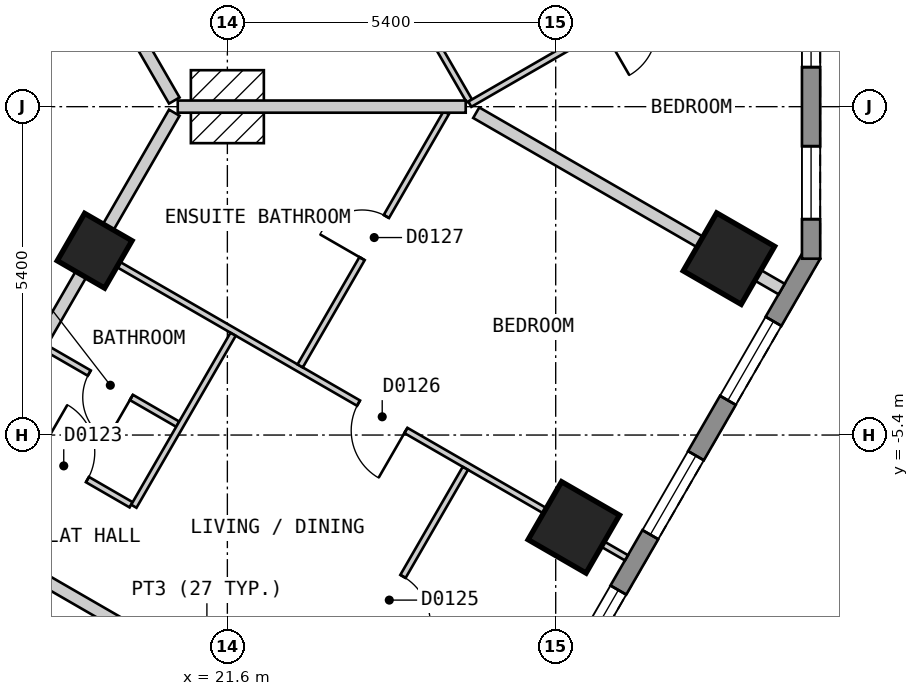
"""IFC4 building model, lengths in metres.
Left out: names, types, materials, properties, quantities, classifications, styles, units other than length and angle.
Written with IfcOpenShell. Run it as: python <this file> out.ifc"""

import sys

from ifc_helpers import new_model, si_unit, direction, frame, frame_2d, origin, origin_2d, place, context, subcontext, project, spatial, polyline, rectangle, outline, extrude, element, fill, save


model = new_model("IFC4")
c1 = context("Model", 3, precision=1e-05, world=origin(), true_north=direction((0.0, 1.0)))
c2 = subcontext(c1, "Body", "Model", "MODEL_VIEW")
j1 = project(units=[si_unit("LENGTHUNIT", "METRE"), si_unit("PLANEANGLEUNIT", "RADIAN")], contexts=[c1])
p1 = place(None, origin())
s1 = spatial("IfcSite", under=j1, at=p1, CompositionType="ELEMENT")
p2 = place(p1, origin())
s2 = spatial("IfcBuilding", under=s1, at=p2, CompositionType="ELEMENT")
p3 = place(p2, frame((0.0, 0.0, 23.4)))
s3 = spatial("IfcBuildingStorey", under=s2, at=p3, CompositionType="ELEMENT", Elevation=23.4)
for number, where, z_axis, x_axis in (
    (1, (27.298, -6.919, 0.0), (0.0, 0.0, 1.0), (0.5, 0.866, 0.0)),
    (2, (29.849, -2.499, 0.0), (0.0, 0.0, 1.0), (0.5, 0.866, 0.0)),
):
    element("IfcColumn", number, at=place(p3, frame(where, z_axis=z_axis, x_axis=x_axis)), inside=s3, PredefinedType="COLUMN", context=c2, shape_type="SweptSolid", body=[
        extrude(rectangle(XDim=1.1, YDim=1.1, at=origin_2d()), origin(), (0.0, 0.0, 1.0), 3.0),
    ])
p4 = place(p3, frame((19.417, -2.369, 0.0), z_axis=(0.0, 0.0, 1.0), x_axis=(0.499984884929, 0.866034130299, 0.0)))
e3 = element("IfcColumn", 3, at=p4, inside=s3, PredefinedType="COLUMN", context=c2, shape_type="SweptSolid", body=[
    extrude(rectangle(XDim=0.9, YDim=0.9, at=origin_2d()), origin(), (0.0, 0.0, 1.0), 3.0),
])
p5 = place(p3, frame((17.71, -25.825, 0.0), z_axis=(0.0, 0.0, 1.0), x_axis=(0.500001938803, 0.866024284413, 0.0)))
e4 = element("IfcWall", 4, at=p5, inside=s3, PredefinedType="SOLIDWALL", context=c2, shape_type="SweptSolid", body=[
    extrude(outline(polyline([(0.0, -0.15), (27.02, -0.15), (26.94, 0.15), (0.08, 0.15), (0.0, -0.15)])), origin(), (0.0, 0.0, 1.0), 2.7),
])
p6 = place(p5, frame((1.277, 0.0, 0.15)))
e5 = element("IfcOpeningElement", 5, at=p6, cuts=e4, PredefinedType="OPENING", context=c2, shape_type="SweptSolid", body=[
    extrude(rectangle(XDim=1.5, YDim=2.1, at=frame_2d((0.75, 1.05))), frame((0.0, 0.16, 0.0), z_axis=(0.0, -1.0, 0.0), x_axis=(1.0, 0.0, 0.0)), (0.0, 0.0, 1.0), 0.32),
])
p7 = place(p5, frame((3.829, 0.0, 0.15)))
e6 = element("IfcOpeningElement", 6, at=p7, cuts=e4, PredefinedType="OPENING", context=c2, shape_type="SweptSolid", body=[
    extrude(rectangle(XDim=1.5, YDim=2.1, at=frame_2d((0.75, 1.05))), frame((0.0, 0.16, 0.0), z_axis=(0.0, -1.0, 0.0), x_axis=(1.0, 0.0, 0.0)), (0.0, 0.0, 1.0), 0.32),
])
p8 = place(p5, frame((6.382, 0.0, 0.15)))
e7 = element("IfcOpeningElement", 7, at=p8, cuts=e4, PredefinedType="OPENING", context=c2, shape_type="SweptSolid", body=[
    extrude(rectangle(XDim=1.5, YDim=2.1, at=frame_2d((0.75, 1.05))), frame((0.0, 0.16, 0.0), z_axis=(0.0, -1.0, 0.0), x_axis=(1.0, 0.0, 0.0)), (0.0, 0.0, 1.0), 0.32),
])
p9 = place(p5, frame((8.933, 0.0, 0.15)))
e8 = element("IfcOpeningElement", 8, at=p9, cuts=e4, PredefinedType="OPENING", context=c2, shape_type="SweptSolid", body=[
    extrude(rectangle(XDim=1.5, YDim=2.1, at=frame_2d((0.75, 1.05))), frame((0.0, 0.16, 0.0), z_axis=(0.0, -1.0, 0.0), x_axis=(1.0, 0.0, 0.0)), (0.0, 0.0, 1.0), 0.32),
])
p10 = place(p5, frame((11.485, 0.0, 0.15)))
e9 = element("IfcOpeningElement", 9, at=p10, cuts=e4, PredefinedType="OPENING", context=c2, shape_type="SweptSolid", body=[
    extrude(rectangle(XDim=1.5, YDim=2.1, at=frame_2d((0.75, 1.05))), frame((0.0, 0.16, 0.0), z_axis=(0.0, -1.0, 0.0), x_axis=(1.0, 0.0, 0.0)), (0.0, 0.0, 1.0), 0.32),
])
p11 = place(p5, frame((14.037, 0.0, 0.15)))
e10 = element("IfcOpeningElement", 10, at=p11, cuts=e4, PredefinedType="OPENING", context=c2, shape_type="SweptSolid", body=[
    extrude(rectangle(XDim=1.5, YDim=2.1, at=frame_2d((0.75, 1.05))), frame((0.0, 0.16, 0.0), z_axis=(0.0, -1.0, 0.0), x_axis=(1.0, 0.0, 0.0)), (0.0, 0.0, 1.0), 0.32),
])
p12 = place(p5, frame((16.589, 0.0, 0.15)))
e11 = element("IfcOpeningElement", 11, at=p12, cuts=e4, PredefinedType="OPENING", context=c2, shape_type="SweptSolid", body=[
    extrude(rectangle(XDim=1.5, YDim=2.1, at=frame_2d((0.75, 1.05))), frame((0.0, 0.16, 0.0), z_axis=(0.0, -1.0, 0.0), x_axis=(1.0, 0.0, 0.0)), (0.0, 0.0, 1.0), 0.32),
])
p13 = place(p5, frame((19.141, 0.0, 0.15)))
e12 = element("IfcOpeningElement", 12, at=p13, cuts=e4, PredefinedType="OPENING", context=c2, shape_type="SweptSolid", body=[
    extrude(rectangle(XDim=1.5, YDim=2.1, at=frame_2d((0.75, 1.05))), frame((0.0, 0.16, 0.0), z_axis=(0.0, -1.0, 0.0), x_axis=(1.0, 0.0, 0.0)), (0.0, 0.0, 1.0), 0.32),
])
p14 = place(p5, frame((21.693, 0.0, 0.15)))
e13 = element("IfcOpeningElement", 13, at=p14, cuts=e4, PredefinedType="OPENING", context=c2, shape_type="SweptSolid", body=[
    extrude(rectangle(XDim=1.5, YDim=2.1, at=frame_2d((0.75, 1.05))), frame((0.0, 0.16, 0.0), z_axis=(0.0, -1.0, 0.0), x_axis=(1.0, 0.0, 0.0)), (0.0, 0.0, 1.0), 0.32),
])
p15 = place(p5, frame((24.244, 0.0, 0.15)))
e14 = element("IfcOpeningElement", 14, at=p15, cuts=e4, PredefinedType="OPENING", context=c2, shape_type="SweptSolid", body=[
    extrude(rectangle(XDim=1.5, YDim=2.1, at=frame_2d((0.75, 1.05))), frame((0.0, 0.16, 0.0), z_axis=(0.0, -1.0, 0.0), x_axis=(1.0, 0.0, 0.0)), (0.0, 0.0, 1.0), 0.32),
])
p16 = place(p3, frame((31.2, -2.5, 0.0), z_axis=(0.0, 0.0, 1.0), x_axis=(0.0, 1.0, 0.0)))
e15 = element("IfcWall", 15, at=p16, inside=s3, PredefinedType="SOLIDWALL", context=c2, shape_type="SweptSolid", body=[
    extrude(outline(polyline([(0.0, -0.15), (5.0, -0.15), (4.92, 0.15), (0.08, 0.15), (0.0, -0.15)])), origin(), (0.0, 0.0, 1.0), 2.7),
])
p17 = place(p16, frame((0.65, 0.0, 0.15)))
e16 = element("IfcOpeningElement", 16, at=p17, cuts=e15, PredefinedType="OPENING", context=c2, shape_type="SweptSolid", body=[
    extrude(rectangle(XDim=1.2, YDim=2.1, at=frame_2d((0.6, 1.05))), frame((0.0, 0.16, 0.0), z_axis=(0.0, -1.0, 0.0), x_axis=(1.0, 0.0, 0.0)), (0.0, 0.0, 1.0), 0.32),
])
p18 = place(p16, frame((3.15, 0.0, 0.15)))
e17 = element("IfcOpeningElement", 17, at=p18, cuts=e15, PredefinedType="OPENING", context=c2, shape_type="SweptSolid", body=[
    extrude(rectangle(XDim=1.2, YDim=2.1, at=frame_2d((0.6, 1.05))), frame((0.0, 0.16, 0.0), z_axis=(0.0, -1.0, 0.0), x_axis=(1.0, 0.0, 0.0)), (0.0, 0.0, 1.0), 0.32),
])
p19 = place(p3, frame((10.45, 17.9, 0.0), z_axis=(0.0, 0.0, 1.0), x_axis=(0.500034352617, -0.866005569383, 0.0)))
e18 = element("IfcWall", 18, at=p19, inside=s3, PredefinedType="PARTITIONING", context=c2, shape_type="SweptSolid", body=[
    extrude(rectangle(XDim=20.553, YDim=0.2, at=frame_2d((10.276, 0.0))), origin(), (0.0, 0.0, 1.0), 2.7),
])
p20 = place(p19, frame((14.903, 0.0, 0.0)))
e19 = element("IfcOpeningElement", 19, at=p20, cuts=e18, PredefinedType="OPENING", context=c2, shape_type="SweptSolid", body=[
    extrude(rectangle(XDim=1.0, YDim=2.1, at=frame_2d((0.5, 1.05))), frame((0.0, 0.11, 0.0), z_axis=(0.0, -1.0, 0.0), x_axis=(1.0, 0.0, 0.0)), (0.0, 0.0, 1.0), 0.22),
])
p21 = place(p19, frame((9.775, 0.0, 0.0)))
e20 = element("IfcOpeningElement", 20, at=p21, cuts=e18, PredefinedType="OPENING", context=c2, shape_type="SweptSolid", body=[
    extrude(rectangle(XDim=1.0, YDim=2.1, at=frame_2d((0.5, 1.05))), frame((0.0, 0.11, 0.0), z_axis=(0.0, -1.0, 0.0), x_axis=(1.0, 0.0, 0.0)), (0.0, 0.0, 1.0), 0.22),
])
p22 = place(p3, frame((16.914, -6.703, 0.0), z_axis=(0.0, 0.0, 1.0), x_axis=(0.50003007663, 0.866008038338, 0.0)))
e21 = element("IfcWall", 21, at=p22, inside=s3, PredefinedType="PARTITIONING", context=c2, shape_type="SweptSolid", body=[
    extrude(rectangle(XDim=7.625, YDim=0.2, at=frame_2d((3.813, 0.0))), origin(), (0.0, 0.0, 1.0), 2.7),
])
p23 = place(p22, frame((1.952, 0.0, 0.0)))
e22 = element("IfcOpeningElement", 22, at=p23, cuts=e21, PredefinedType="OPENING", context=c2, shape_type="SweptSolid", body=[
    extrude(rectangle(XDim=1.0, YDim=2.1, at=frame_2d((0.5, 1.05))), frame((0.0, 0.11, 0.0), z_axis=(0.0, -1.0, 0.0), x_axis=(1.0, 0.0, 0.0)), (0.0, 0.0, 1.0), 0.22),
])
p24 = place(p3, frame((20.551, 8.805, 0.0), z_axis=(0.0, 0.0, 1.0), x_axis=(0.499984387913, -0.86603441724, 0.0)))
e23 = element("IfcWall", 23, at=p24, inside=s3, PredefinedType="PARTITIONING", context=c2, shape_type="SweptSolid", body=[
    extrude(rectangle(XDim=10.058, YDim=0.1, at=frame_2d((5.029, 0.0))), origin(), (0.0, 0.0, 1.0), 2.7),
])
p25 = place(p24, frame((1.978, 0.0, 0.0)))
e24 = element("IfcOpeningElement", 24, at=p25, cuts=e23, PredefinedType="OPENING", context=c2, shape_type="SweptSolid", body=[
    extrude(rectangle(XDim=0.9, YDim=2.1, at=frame_2d((0.45, 1.05))), frame((0.0, 0.06, 0.0), z_axis=(0.0, -1.0, 0.0), x_axis=(1.0, 0.0, 0.0)), (0.0, 0.0, 1.0), 0.12),
])
p26 = place(p24, frame((7.157, 0.0, 0.0)))
e25 = element("IfcOpeningElement", 25, at=p26, cuts=e23, PredefinedType="OPENING", context=c2, shape_type="SweptSolid", body=[
    extrude(rectangle(XDim=0.8, YDim=2.1, at=frame_2d((0.4, 1.05))), frame((0.0, 0.06, 0.0), z_axis=(0.0, -1.0, 0.0), x_axis=(1.0, 0.0, 0.0)), (0.0, 0.0, 1.0), 0.12),
])
p27 = place(p3, frame((17.844, -5.292, 0.0), z_axis=(0.0, 0.0, 1.0), x_axis=(0.865940918122, -0.500146304917, 0.0)))
e26 = element("IfcWall", 26, at=p27, inside=s3, PredefinedType="PARTITIONING", context=c2, shape_type="SweptSolid", body=[
    extrude(rectangle(XDim=2.51, YDim=0.1, at=frame_2d((1.255, 0.0))), origin(), (0.0, 0.0, 1.0), 2.7),
])
p28 = place(p27, frame((0.78, 0.0, 0.0)))
e27 = element("IfcOpeningElement", 27, at=p28, cuts=e26, PredefinedType="OPENING", context=c2, shape_type="SweptSolid", body=[
    extrude(rectangle(XDim=0.9, YDim=2.1, at=frame_2d((0.45, 1.05))), frame((0.0, 0.06, 0.0), z_axis=(0.0, -1.0, 0.0), x_axis=(1.0, 0.0, 0.0)), (0.0, 0.0, 1.0), 0.12),
])
p29 = place(p3, frame((18.61, -3.966, 0.0), z_axis=(0.0, 0.0, 1.0), x_axis=(0.865958718457, -0.500115484592, 0.0)))
e28 = element("IfcWall", 28, at=p29, inside=s3, PredefinedType="PARTITIONING", context=c2, shape_type="SweptSolid", body=[
    extrude(rectangle(XDim=2.509, YDim=0.1, at=frame_2d((1.255, 0.0))), origin(), (0.0, 0.0, 1.0), 2.7),
])
p30 = place(p29, frame((0.83, 0.0, 0.0)))
e29 = element("IfcOpeningElement", 29, at=p30, cuts=e28, PredefinedType="OPENING", context=c2, shape_type="SweptSolid", body=[
    extrude(rectangle(XDim=0.8, YDim=2.1, at=frame_2d((0.4, 1.05))), frame((0.0, 0.06, 0.0), z_axis=(0.0, -1.0, 0.0), x_axis=(1.0, 0.0, 0.0)), (0.0, 0.0, 1.0), 0.12),
])
p31 = place(p3, frame((19.503, -2.419, 0.0), z_axis=(0.0, 0.0, 1.0), x_axis=(0.866047370643, -0.499961950354, 0.0)))
e30 = element("IfcWall", 30, at=p31, inside=s3, PredefinedType="PARTITIONING", context=c2, shape_type="SweptSolid", body=[
    extrude(rectangle(XDim=10.001, YDim=0.1, at=frame_2d((5.0, 0.0))), origin(), (0.0, 0.0, 1.0), 2.7),
])
p32 = place(p31, frame((4.912, 0.0, 0.0)))
e31 = element("IfcOpeningElement", 31, at=p32, cuts=e30, PredefinedType="OPENING", context=c2, shape_type="SweptSolid", body=[
    extrude(rectangle(XDim=0.9, YDim=2.1, at=frame_2d((0.45, 1.05))), frame((0.0, 0.06, 0.0), z_axis=(0.0, -1.0, 0.0), x_axis=(1.0, 0.0, 0.0)), (0.0, 0.0, 1.0), 0.12),
])
p33 = place(p3, frame((20.062, -6.571, 0.0), z_axis=(0.0, 0.0, 1.0), x_axis=(0.49983032932, 0.866123341039, 0.0)))
e32 = element("IfcWall", 32, at=p33, inside=s3, PredefinedType="PARTITIONING", context=c2, shape_type="SweptSolid", body=[
    extrude(rectangle(XDim=3.265, YDim=0.1, at=frame_2d((1.633, 0.0))), origin(), (0.0, 0.0, 1.0), 2.7),
])
p34 = place(p3, frame((22.797, -4.263, 0.0), z_axis=(0.0, 0.0, 1.0), x_axis=(0.499820637322, 0.866128934112, 0.0)))
e33 = element("IfcWall", 33, at=p34, inside=s3, PredefinedType="PARTITIONING", context=c2, shape_type="SweptSolid", body=[
    extrude(rectangle(XDim=4.807, YDim=0.1, at=frame_2d((2.404, 0.0))), origin(), (0.0, 0.0, 1.0), 2.7),
])
p35 = place(p34, frame((2.037, 0.0, 0.0)))
e34 = element("IfcOpeningElement", 34, at=p35, cuts=e33, PredefinedType="OPENING", context=c2, shape_type="SweptSolid", body=[
    extrude(rectangle(XDim=0.8, YDim=2.1, at=frame_2d((0.4, 1.05))), frame((0.0, 0.06, 0.0), z_axis=(0.0, -1.0, 0.0), x_axis=(1.0, 0.0, 0.0)), (0.0, 0.0, 1.0), 0.12),
])
p36 = place(p3, frame((23.037, -10.238, 0.0), z_axis=(0.0, 0.0, 1.0), x_axis=(0.49999264683, 0.866029649098, 0.0)))
e35 = element("IfcWall", 35, at=p36, inside=s3, PredefinedType="PARTITIONING", context=c2, shape_type="SweptSolid", body=[
    extrude(rectangle(XDim=4.954, YDim=0.1, at=frame_2d((2.477, 0.0))), origin(), (0.0, 0.0, 1.0), 2.7),
])
p37 = place(p36, frame((2.002, 0.0, 0.0)))
e36 = element("IfcOpeningElement", 36, at=p37, cuts=e35, PredefinedType="OPENING", context=c2, shape_type="SweptSolid", body=[
    extrude(rectangle(XDim=0.9, YDim=2.1, at=frame_2d((0.45, 1.05))), frame((0.0, 0.06, 0.0), z_axis=(0.0, -1.0, 0.0), x_axis=(1.0, 0.0, 0.0)), (0.0, 0.0, 1.0), 0.12),
])
p38 = place(p3, frame((25.588, 0.041, 0.0), z_axis=(0.0, 0.0, 1.0), x_axis=(0.866113484451, 0.499847408768, 0.0)))
e37 = element("IfcWall", 37, at=p38, inside=s3, PredefinedType="PARTITIONING", context=c2, shape_type="SweptSolid", body=[
    extrude(rectangle(XDim=5.92, YDim=0.1, at=frame_2d((2.96, 0.0))), origin(), (0.0, 0.0, 1.0), 2.7),
])
p39 = place(p38, frame((2.51, 0.0, 0.0)))
e38 = element("IfcOpeningElement", 38, at=p39, cuts=e37, PredefinedType="OPENING", context=c2, shape_type="SweptSolid", body=[
    extrude(rectangle(XDim=0.9, YDim=2.1, at=frame_2d((0.45, 1.05))), frame((0.0, 0.06, 0.0), z_axis=(0.0, -1.0, 0.0), x_axis=(1.0, 0.0, 0.0)), (0.0, 0.0, 1.0), 0.12),
])
p40 = place(p3, frame((25.693, -0.099, 0.0), z_axis=(0.0, 0.0, 1.0), x_axis=(0.866032775405, -0.499987231761, 0.0)))
e39 = element("IfcWall", 39, at=p40, inside=s3, PredefinedType="PARTITIONING", context=c2, shape_type="SweptSolid", body=[
    extrude(rectangle(XDim=5.8, YDim=0.2, at=frame_2d((2.9, 0.0))), origin(), (0.0, 0.0, 1.0), 2.7),
])
p41 = place(p3, frame((16.916, -6.819, 0.0), z_axis=(0.0, 0.0, 1.0), x_axis=(0.866028876723, -0.499993984646, 0.0)))
e40 = element("IfcWall", 40, at=p41, inside=s3, PredefinedType="PARTITIONING", context=c2, shape_type="SweptSolid", body=[
    extrude(rectangle(XDim=10.04, YDim=0.2, at=frame_2d((5.02, 0.0))), origin(), (0.0, 0.0, 1.0), 2.7),
])
p42 = place(p3, frame((20.784, 0.001, 0.0), z_axis=(0.0, 0.0, 1.0), x_axis=(1.0, 0.0, 0.0)))
e41 = element("IfcWall", 41, at=p42, inside=s3, PredefinedType="PARTITIONING", context=c2, shape_type="SweptSolid", body=[
    extrude(rectangle(XDim=4.736, YDim=0.2, at=frame_2d((2.368, 0.0))), origin(), (0.0, 0.0, 1.0), 2.7),
])
p43 = place(p13, origin())
e42 = element("IfcWindow", 42, at=p43, inside=s3, PartitioningType="SINGLE_PANEL", PredefinedType="WINDOW", context=c2, shape_type="SweptSolid", body=[
    extrude(rectangle(XDim=1.5, YDim=2.1, at=frame_2d((0.75, 1.05))), frame((0.0, 0.03, 0.0), z_axis=(0.0, -1.0, 0.0), x_axis=(1.0, 0.0, 0.0)), (0.0, 0.0, 1.0), 0.06),
])
fill(e12, e42)
p44 = place(p14, origin())
e43 = element("IfcWindow", 43, at=p44, inside=s3, PartitioningType="SINGLE_PANEL", PredefinedType="WINDOW", context=c2, shape_type="SweptSolid", body=[
    extrude(rectangle(XDim=1.5, YDim=2.1, at=frame_2d((0.75, 1.05))), frame((0.0, 0.03, 0.0), z_axis=(0.0, -1.0, 0.0), x_axis=(1.0, 0.0, 0.0)), (0.0, 0.0, 1.0), 0.06),
])
fill(e13, e43)
p45 = place(p15, origin())
e44 = element("IfcWindow", 44, at=p45, inside=s3, PartitioningType="SINGLE_PANEL", PredefinedType="WINDOW", context=c2, shape_type="SweptSolid", body=[
    extrude(rectangle(XDim=1.5, YDim=2.1, at=frame_2d((0.75, 1.05))), frame((0.0, 0.03, 0.0), z_axis=(0.0, -1.0, 0.0), x_axis=(1.0, 0.0, 0.0)), (0.0, 0.0, 1.0), 0.06),
])
fill(e14, e44)
p46 = place(p17, origin())
e45 = element("IfcWindow", 45, at=p46, inside=s3, PartitioningType="SINGLE_PANEL", PredefinedType="WINDOW", context=c2, shape_type="SweptSolid", body=[
    extrude(rectangle(XDim=1.2, YDim=2.1, at=frame_2d((0.6, 1.05))), frame((0.0, 0.03, 0.0), z_axis=(0.0, -1.0, 0.0), x_axis=(1.0, 0.0, 0.0)), (0.0, 0.0, 1.0), 0.06),
])
fill(e16, e45)
p47 = place(p18, origin())
e46 = element("IfcWindow", 46, at=p47, inside=s3, PartitioningType="SINGLE_PANEL", PredefinedType="WINDOW", context=c2, shape_type="SweptSolid", body=[
    extrude(rectangle(XDim=1.2, YDim=2.1, at=frame_2d((0.6, 1.05))), frame((0.0, 0.03, 0.0), z_axis=(0.0, -1.0, 0.0), x_axis=(1.0, 0.0, 0.0)), (0.0, 0.0, 1.0), 0.06),
])
fill(e17, e46)
p48 = place(p28, origin())
e47 = element("IfcDoor", 47, at=p48, inside=s3, OperationType="SINGLE_SWING_LEFT", PredefinedType="DOOR", context=c2, shape_type="SweptSolid", body=[
    extrude(rectangle(XDim=0.9, YDim=2.1, at=frame_2d((0.45, 1.05))), frame((0.0, 0.025, 0.0), z_axis=(0.0, -1.0, 0.0), x_axis=(1.0, 0.0, 0.0)), (0.0, 0.0, 1.0), 0.05),
])
fill(e27, e47)
p49 = place(p30, origin())
e48 = element("IfcDoor", 48, at=p49, inside=s3, OperationType="SINGLE_SWING_RIGHT", PredefinedType="DOOR", context=c2, shape_type="SweptSolid", body=[
    extrude(rectangle(XDim=0.8, YDim=2.1, at=frame_2d((0.4, 1.05))), frame((0.0, 0.025, 0.0), z_axis=(0.0, -1.0, 0.0), x_axis=(1.0, 0.0, 0.0)), (0.0, 0.0, 1.0), 0.05),
])
fill(e29, e48)
p50 = place(p37, origin())
e49 = element("IfcDoor", 49, at=p50, inside=s3, OperationType="SINGLE_SWING_LEFT", PredefinedType="DOOR", context=c2, shape_type="SweptSolid", body=[
    extrude(rectangle(XDim=0.9, YDim=2.1, at=frame_2d((0.45, 1.05))), frame((0.0, 0.025, 0.0), z_axis=(0.0, -1.0, 0.0), x_axis=(1.0, 0.0, 0.0)), (0.0, 0.0, 1.0), 0.05),
])
fill(e36, e49)
p51 = place(p32, origin())
e50 = element("IfcDoor", 50, at=p51, inside=s3, OperationType="SINGLE_SWING_RIGHT", PredefinedType="DOOR", context=c2, shape_type="SweptSolid", body=[
    extrude(rectangle(XDim=0.9, YDim=2.1, at=frame_2d((0.45, 1.05))), frame((0.0, 0.025, 0.0), z_axis=(0.0, -1.0, 0.0), x_axis=(1.0, 0.0, 0.0)), (0.0, 0.0, 1.0), 0.05),
])
fill(e31, e50)
p52 = place(p35, origin())
e51 = element("IfcDoor", 51, at=p52, inside=s3, OperationType="SINGLE_SWING_LEFT", PredefinedType="DOOR", context=c2, shape_type="SweptSolid", body=[
    extrude(rectangle(XDim=0.8, YDim=2.1, at=frame_2d((0.4, 1.05))), frame((0.0, 0.025, 0.0), z_axis=(0.0, -1.0, 0.0), x_axis=(1.0, 0.0, 0.0)), (0.0, 0.0, 1.0), 0.05),
])
fill(e34, e51)
save(model, sys.argv[1])
